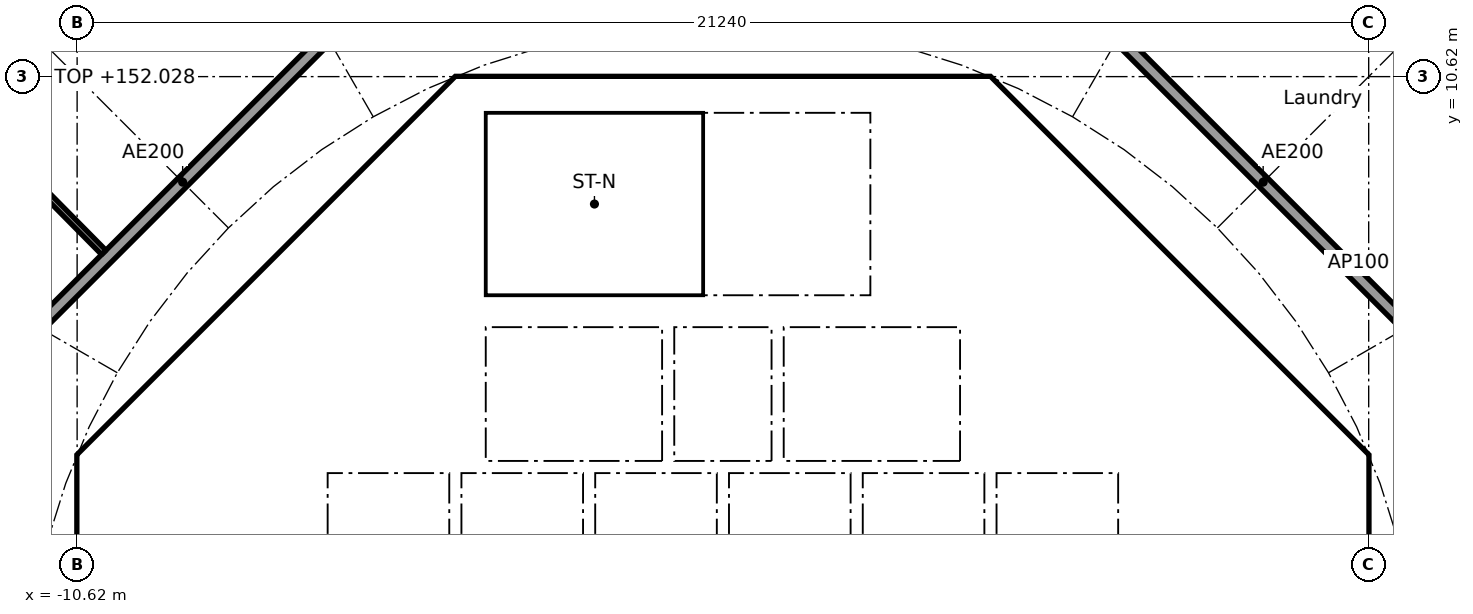
"""IFC4 building model, lengths in metres.
Left out: names, types, materials, properties, quantities, classifications, styles, units other than length and angle.
Written with IfcOpenShell. Run it as: python <this file> out.ifc"""

import sys

from ifc_helpers import new_model, si_unit, direction, frame, frame_2d, origin, place, context, subcontext, project, spatial, polyline, rectangle, outline, extrude, element, fill, save


model = new_model("IFC4")
c1 = context("Model", 3, precision=1e-05, world=origin(), true_north=direction((0.0, 1.0)))
c2 = subcontext(c1, "Body", "Model", "MODEL_VIEW")
j1 = project(units=[si_unit("LENGTHUNIT", "METRE"), si_unit("PLANEANGLEUNIT", "RADIAN")], contexts=[c1])
p1 = place(None, origin())
s1 = spatial("IfcSite", under=j1, at=p1, CompositionType="ELEMENT")
p2 = place(p1, origin())
s2 = spatial("IfcBuilding", under=s1, at=p2, CompositionType="ELEMENT")
p3 = place(p2, frame((0.0, 0.0, 149.2)))
s3 = spatial("IfcBuildingStorey", under=s2, at=p3, CompositionType="ELEMENT", Elevation=149.2)
p4 = place(p3, frame((9.988, 4.613, 0.0), z_axis=(0.0, 0.0, 1.0), x_axis=(-0.707106781187, 0.707106781187, 0.0)))
e1 = element("IfcWall", 1, at=p4, inside=s3, PredefinedType="SHEAR", context=c2, shape_type="SweptSolid", body=[
    extrude(rectangle(XDim=7.602, YDim=0.6, at=frame_2d((3.801, 0.0))), origin(), (0.0, 0.0, 1.0), 3.44),
])
p5 = place(p4, frame((3.201, 0.0, 0.0)))
e2 = element("IfcOpeningElement", 2, at=p5, cuts=e1, PredefinedType="OPENING", context=c2, shape_type="SweptSolid", body=[
    extrude(rectangle(XDim=1.2, YDim=2.1, at=frame_2d((0.6, 1.05))), frame((0.0, 0.31, 0.0), z_axis=(0.0, -1.0, 0.0), x_axis=(1.0, 0.0, 0.0)), (0.0, 0.0, 1.0), 0.62),
])
p6 = place(p3, frame((-4.613, 9.988, 0.0), z_axis=(0.0, 0.0, 1.0), x_axis=(-0.707106781187, -0.707106781187, 0.0)))
e3 = element("IfcWall", 3, at=p6, inside=s3, PredefinedType="SHEAR", context=c2, shape_type="SweptSolid", body=[
    extrude(rectangle(XDim=7.602, YDim=0.6, at=frame_2d((3.801, 0.0))), origin(), (0.0, 0.0, 1.0), 3.44),
])
p7 = place(p6, frame((0.351, 0.0, 0.0)))
e4 = element("IfcOpeningElement", 4, at=p7, cuts=e3, PredefinedType="OPENING", context=c2, shape_type="SweptSolid", body=[
    extrude(rectangle(XDim=1.1, YDim=2.1, at=frame_2d((0.55, 1.05))), frame((0.0, 0.31, 0.0), z_axis=(0.0, -1.0, 0.0), x_axis=(1.0, 0.0, 0.0)), (0.0, 0.0, 1.0), 0.62),
])
p8 = place(p3, frame((-10.325, 3.801, 0.0), z_axis=(0.0, 0.0, 1.0), x_axis=(0.0, -1.0, 0.0)))
e5 = element("IfcWall", 5, at=p8, inside=s3, PredefinedType="SHEAR", context=c2, shape_type="SweptSolid", body=[
    extrude(rectangle(XDim=7.602, YDim=0.6, at=frame_2d((3.801, 0.0))), origin(), (0.0, 0.0, 1.0), 3.44),
])
p9 = place(p8, frame((0.651, 0.0, 0.0)))
e6 = element("IfcOpeningElement", 6, at=p9, cuts=e5, PredefinedType="OPENING", context=c2, shape_type="SweptSolid", body=[
    extrude(rectangle(XDim=1.5, YDim=2.1, at=frame_2d((0.75, 1.05))), frame((0.0, 0.31, 0.0), z_axis=(0.0, -1.0, 0.0), x_axis=(1.0, 0.0, 0.0)), (0.0, 0.0, 1.0), 0.62),
])
p10 = place(p8, frame((5.451, 0.0, 0.0)))
e7 = element("IfcOpeningElement", 7, at=p10, cuts=e5, PredefinedType="OPENING", context=c2, shape_type="SweptSolid", body=[
    extrude(rectangle(XDim=1.5, YDim=2.1, at=frame_2d((0.75, 1.05))), frame((0.0, 0.31, 0.0), z_axis=(0.0, -1.0, 0.0), x_axis=(1.0, 0.0, 0.0)), (0.0, 0.0, 1.0), 0.62),
])
p11 = place(p3, frame((-5.8, 4.3, 0.0), z_axis=(0.0, 0.0, 1.0), x_axis=(0.0, 1.0, 0.0)))
e8 = element("IfcWall", 8, at=p11, inside=s3, PredefinedType="PARTITIONING", context=c2, shape_type="SweptSolid", body=[
    extrude(rectangle(XDim=3.927, YDim=0.15, at=frame_2d((1.963, 0.0))), origin(), (0.0, 0.0, 1.0), 3.44),
])
p12 = place(p11, frame((1.551, 0.0, 0.0)))
e9 = element("IfcOpeningElement", 9, at=p12, cuts=e8, PredefinedType="OPENING", context=c2, shape_type="SweptSolid", body=[
    extrude(rectangle(XDim=0.9, YDim=2.1, at=frame_2d((0.45, 1.05))), frame((0.0, 0.085, 0.0), z_axis=(0.0, -1.0, 0.0), x_axis=(1.0, 0.0, 0.0)), (0.0, 0.0, 1.0), 0.17),
])
p13 = place(p3, frame((4.0, 4.3, 0.0), z_axis=(0.0, 0.0, 1.0), x_axis=(0.0, 1.0, 0.0)))
e10 = element("IfcWall", 10, at=p13, inside=s3, PredefinedType="SOLIDWALL", context=c2, shape_type="SweptSolid", body=[
    extrude(rectangle(XDim=2.2, YDim=0.2, at=frame_2d((1.1, 0.0))), origin(), (0.0, 0.0, 1.0), 3.44),
])
p14 = place(p13, frame((0.55, 0.0, 0.0)))
e11 = element("IfcOpeningElement", 11, at=p14, cuts=e10, PredefinedType="OPENING", context=c2, shape_type="SweptSolid", body=[
    extrude(rectangle(XDim=1.1, YDim=2.1, at=frame_2d((0.55, 1.05))), frame((0.0, 0.11, 0.0), z_axis=(0.0, -1.0, 0.0), x_axis=(1.0, 0.0, 0.0)), (0.0, 0.0, 1.0), 0.22),
])
p15 = place(p3, frame((-4.0, 4.3, 0.0), z_axis=(0.0, 0.0, 1.0), x_axis=(0.0, 1.0, 0.0)))
e12 = element("IfcWall", 12, at=p15, inside=s3, PredefinedType="SOLIDWALL", context=c2, shape_type="SweptSolid", body=[
    extrude(rectangle(XDim=2.2, YDim=0.2, at=frame_2d((1.1, 0.0))), origin(), (0.0, 0.0, 1.0), 3.44),
])
p16 = place(p15, frame((0.55, 0.0, 0.0)))
e13 = element("IfcOpeningElement", 13, at=p16, cuts=e12, PredefinedType="OPENING", context=c2, shape_type="SweptSolid", body=[
    extrude(rectangle(XDim=1.1, YDim=2.1, at=frame_2d((0.55, 1.05))), frame((0.0, 0.11, 0.0), z_axis=(0.0, -1.0, 0.0), x_axis=(1.0, 0.0, 0.0)), (0.0, 0.0, 1.0), 0.22),
])
p17 = place(p3, frame((6.7, 4.0, 0.0), z_axis=(0.0, 0.0, 1.0), x_axis=(1.0, 0.0, 0.0)))
e14 = element("IfcWall", 14, at=p17, inside=s3, PredefinedType="SOLIDWALL", context=c2, shape_type="SweptSolid", body=[
    extrude(rectangle(XDim=3.325, YDim=0.2, at=frame_2d((1.662, 0.0))), origin(), (0.0, 0.0, 1.0), 3.44),
])
p18 = place(p17, frame((1.25, 0.0, 0.0)))
e15 = element("IfcOpeningElement", 15, at=p18, cuts=e14, PredefinedType="OPENING", context=c2, shape_type="SweptSolid", body=[
    extrude(rectangle(XDim=1.1, YDim=2.1, at=frame_2d((0.55, 1.05))), frame((0.0, 0.11, 0.0), z_axis=(0.0, -1.0, 0.0), x_axis=(1.0, 0.0, 0.0)), (0.0, 0.0, 1.0), 0.22),
])
p19 = place(p3, frame((4.0, 7.025, 0.0), z_axis=(0.0, 0.0, 1.0), x_axis=(0.0, 1.0, 0.0)))
e16 = element("IfcWall", 16, at=p19, inside=s3, PredefinedType="SOLIDWALL", context=c2, shape_type="SweptSolid", body=[
    extrude(rectangle(XDim=3.0, YDim=0.2, at=frame_2d((1.5, 0.0))), origin(), (0.0, 0.0, 1.0), 3.44),
])
p20 = place(p19, frame((0.925, 0.0, 0.0)))
e17 = element("IfcOpeningElement", 17, at=p20, cuts=e16, PredefinedType="OPENING", context=c2, shape_type="SweptSolid", body=[
    extrude(rectangle(XDim=1.1, YDim=2.1, at=frame_2d((0.55, 1.05))), frame((0.0, 0.11, 0.0), z_axis=(0.0, -1.0, 0.0), x_axis=(1.0, 0.0, 0.0)), (0.0, 0.0, 1.0), 0.22),
])
p21 = place(p3, origin())
e18 = element("IfcWall", 18, at=p21, inside=s3, PredefinedType="SHEAR", context=c2, shape_type="SweptSolid", body=[
    extrude(outline(polyline([(-10.2, 4.825), (-9.776, 4.401), (-10.025, 4.152), (-10.025, 3.801), (-10.625, 3.801), (-10.625, 4.401), (-10.2, 4.825)])), origin(), (0.0, 0.0, 1.0), 3.44),
])
p22 = place(p3, origin())
e19 = element("IfcWall", 19, at=p22, inside=s3, PredefinedType="SHEAR", context=c2, shape_type="SweptSolid", body=[
    extrude(outline(polyline([(-4.152, 10.025), (-4.401, 9.776), (-4.825, 10.2), (-4.401, 10.625), (4.401, 10.625), (4.825, 10.2), (4.401, 9.776), (4.152, 10.025), (-4.152, 10.025)])), origin(), (0.0, 0.0, 1.0), 3.44),
])
p23 = place(p3, origin())
e20 = element("IfcWall", 20, at=p23, inside=s3, PredefinedType="SHEAR", context=c2, shape_type="SweptSolid", body=[
    extrude(outline(polyline([(9.776, -4.401), (10.025, -4.152), (10.025, -3.801), (10.025, 4.152), (9.776, 4.401), (10.2, 4.825), (10.625, 4.401), (10.625, -4.401), (10.2, -4.825), (9.776, -4.401)])), origin(), (0.0, 0.0, 1.0), 3.44),
])
for number, where, z_axis, x_axis in (
    (21, (-0.9, 4.3, 0.0), (0.0, 0.0, 1.0), (0.0, 1.0, 0.0)),
    (22, (0.9, 4.3, 0.0), (0.0, 0.0, 1.0), (0.0, 1.0, 0.0)),
):
    element("IfcWall", number, at=place(p3, frame(where, z_axis=z_axis, x_axis=x_axis)), inside=s3, PredefinedType="SOLIDWALL", context=c2, shape_type="SweptSolid", body=[
        extrude(rectangle(XDim=2.2, YDim=0.2, at=frame_2d((1.1, 0.0))), origin(), (0.0, 0.0, 1.0), 3.44),
    ])
p24 = place(p3, origin())
e23 = element("IfcWall", 23, at=p24, inside=s3, PredefinedType="SOLIDWALL", context=c2, shape_type="SweptSolid", body=[
    extrude(outline(polyline([(-6.5, 2.1), (-6.7, 2.1), (-6.7, 4.3), (6.7, 4.3), (6.7, 2.1), (6.5, 2.1), (6.5, 4.1), (4.5, 4.1), (4.5, 2.1), (4.3, 2.1), (4.3, 4.1), (2.3, 4.1), (2.3, 2.1), (2.1, 2.1), (2.1, 4.1), (0.1, 4.1), (0.1, 2.1), (-0.1, 2.1), (-0.1, 4.1), (-2.1, 4.1), (-2.1, 2.1), (-2.3, 2.1), (-2.3, 4.1), (-4.3, 4.1), (-4.3, 2.1), (-4.5, 2.1), (-4.5, 4.1), (-6.5, 4.1), (-6.5, 2.1)])), origin(), (0.0, 0.0, 1.0), 3.44),
])
p25 = place(p3, frame((-10.025, 4.0, 0.0), z_axis=(0.0, 0.0, 1.0), x_axis=(1.0, 0.0, 0.0)))
e24 = element("IfcWall", 24, at=p25, inside=s3, PredefinedType="PARTITIONING", context=c2, shape_type="SweptSolid", body=[
    extrude(rectangle(XDim=3.325, YDim=0.2, at=frame_2d((1.662, 0.0))), origin(), (0.0, 0.0, 1.0), 3.44),
])
p26 = place(p3, origin())
e25 = element("IfcWall", 25, at=p26, inside=s3, PredefinedType="SOLIDWALL", context=c2, shape_type="SweptSolid", body=[
    extrude(outline(polyline([(-3.9, 7.025), (-4.1, 7.025), (-4.1, 10.025), (-3.9, 10.025), (-3.9, 7.025)])), origin(), (0.0, 0.0, 1.0), 3.44),
])
p27 = place(p3, origin())
e26 = element("IfcWall", 26, at=p27, inside=s3, PredefinedType="SOLIDWALL", context=c2, shape_type="SweptSolid", body=[
    extrude(outline(polyline([(4.1, 6.5), (-4.1, 6.5), (-4.1, 7.025), (4.1, 7.025), (4.1, 6.5)])), origin(), (0.0, 0.0, 1.0), 3.44),
])
p28 = place(p3, origin())
e27 = element("IfcWall", 27, at=p28, inside=s3, PredefinedType="SOLIDWALL", context=c2, shape_type="SweptSolid", body=[
    extrude(outline(polyline([(7.025, -3.9), (6.7, -3.9), (6.7, 3.9), (7.025, 3.9), (7.025, -3.9)])), origin(), (0.0, 0.0, 1.0), 3.44),
])
p29 = place(p3, frame((12.635, 5.134, 0.0), z_axis=(0.0, 0.0, 1.0), x_axis=(-0.707106781187, 0.707106781187, 0.0)))
e28 = element("IfcWall", 28, at=p29, inside=s3, PredefinedType="PARTITIONING", context=c2, shape_type="SweptSolid", body=[
    extrude(rectangle(XDim=10.609, YDim=0.2, at=frame_2d((5.305, 0.0))), origin(), (0.0, 0.0, 1.0), 3.44),
])
p30 = place(p3, frame((-5.275, 12.494, 0.0), z_axis=(0.0, 0.0, 1.0), x_axis=(-0.707106781187, -0.707106781187, 0.0)))
e29 = element("IfcWall", 29, at=p30, inside=s3, PredefinedType="PARTITIONING", context=c2, shape_type="SweptSolid", body=[
    extrude(rectangle(XDim=10.209, YDim=0.2, at=frame_2d((5.104, 0.0))), origin(), (0.0, 0.0, 1.0), 3.44),
])
p31 = place(p3, frame((15.185, 6.559, 0.0), z_axis=(0.0, 0.0, 1.0), x_axis=(-0.647361044962, 0.762183493304, 0.0)))
e30 = element("IfcWall", 30, at=p31, inside=s3, PredefinedType="PARTITIONING", context=c2, shape_type="SweptSolid", body=[
    extrude(rectangle(XDim=6.413, YDim=0.1, at=frame_2d((3.207, 0.0))), origin(), (0.0, 0.0, 1.0), 2.828),
])
p32 = place(p31, frame((2.731, 0.0, 0.0)))
e31 = element("IfcOpeningElement", 31, at=p32, cuts=e30, PredefinedType="OPENING", context=c2, shape_type="SweptSolid", body=[
    extrude(rectangle(XDim=0.9, YDim=2.1, at=frame_2d((0.45, 1.05))), frame((0.0, 0.06, 0.0), z_axis=(0.0, -1.0, 0.0), x_axis=(1.0, 0.0, 0.0)), (0.0, 0.0, 1.0), 0.12),
])
p33 = place(p3, frame((-9.622, 13.634, 0.0), z_axis=(0.0, 0.0, 1.0), x_axis=(-0.727710859679, -0.685884031528, 0.0)))
e32 = element("IfcWall", 32, at=p33, inside=s3, PredefinedType="PARTITIONING", context=c2, shape_type="SweptSolid", body=[
    extrude(rectangle(XDim=4.5, YDim=0.1, at=frame_2d((2.25, 0.0))), origin(), (0.0, 0.0, 1.0), 2.828),
])
p34 = place(p33, frame((1.825, 0.0, 0.0)))
e33 = element("IfcOpeningElement", 33, at=p34, cuts=e32, PredefinedType="OPENING", context=c2, shape_type="SweptSolid", body=[
    extrude(rectangle(XDim=0.9, YDim=2.1, at=frame_2d((0.45, 1.05))), frame((0.0, 0.06, 0.0), z_axis=(0.0, -1.0, 0.0), x_axis=(1.0, 0.0, 0.0)), (0.0, 0.0, 1.0), 0.12),
])
p35 = place(p3, frame((-10.182, 7.729, 0.0), z_axis=(0.0, 0.0, 1.0), x_axis=(-0.702927211734, 0.711261790766, 0.0)))
e34 = element("IfcWall", 34, at=p35, inside=s3, PredefinedType="PARTITIONING", context=c2, shape_type="SweptSolid", body=[
    extrude(rectangle(XDim=9.168, YDim=0.1, at=frame_2d((4.584, 0.0))), origin(), (0.0, 0.0, 1.0), 2.756),
])
p36 = place(p35, frame((6.067, 0.0, 0.0)))
e35 = element("IfcOpeningElement", 35, at=p36, cuts=e34, PredefinedType="OPENING", context=c2, shape_type="SweptSolid", body=[
    extrude(rectangle(XDim=0.9, YDim=2.1, at=frame_2d((0.45, 1.05))), frame((0.0, 0.06, 0.0), z_axis=(0.0, -1.0, 0.0), x_axis=(1.0, 0.0, 0.0)), (0.0, 0.0, 1.0), 0.12),
])
p37 = place(p14, origin())
e36 = element("IfcDoor", 36, at=p37, inside=s3, OperationType="DOUBLE_DOOR_SLIDING", PredefinedType="DOOR", context=c2, shape_type="SweptSolid", body=[
    extrude(rectangle(XDim=1.1, YDim=2.1, at=frame_2d((0.55, 1.05))), frame((0.0, 0.025, 0.0), z_axis=(0.0, -1.0, 0.0), x_axis=(1.0, 0.0, 0.0)), (0.0, 0.0, 1.0), 0.05),
])
fill(e11, e36)
p38 = place(p16, origin())
e37 = element("IfcDoor", 37, at=p38, inside=s3, OperationType="DOUBLE_DOOR_SLIDING", PredefinedType="DOOR", context=c2, shape_type="SweptSolid", body=[
    extrude(rectangle(XDim=1.1, YDim=2.1, at=frame_2d((0.55, 1.05))), frame((0.0, 0.025, 0.0), z_axis=(0.0, -1.0, 0.0), x_axis=(1.0, 0.0, 0.0)), (0.0, 0.0, 1.0), 0.05),
])
fill(e13, e37)
p39 = place(p18, frame((1.1, 0.0, 0.0), x_axis=(-1.0, 0.0, 0.0)))
e38 = element("IfcDoor", 38, at=p39, inside=s3, OperationType="SINGLE_SWING_LEFT", PredefinedType="DOOR", context=c2, shape_type="SweptSolid", body=[
    extrude(rectangle(XDim=1.1, YDim=2.1, at=frame_2d((0.55, 1.05))), frame((0.0, 0.025, 0.0), z_axis=(0.0, -1.0, 0.0), x_axis=(1.0, 0.0, 0.0)), (0.0, 0.0, 1.0), 0.05),
])
fill(e15, e38)
p40 = place(p20, origin())
e39 = element("IfcDoor", 39, at=p40, inside=s3, OperationType="SINGLE_SWING_RIGHT", PredefinedType="DOOR", context=c2, shape_type="SweptSolid", body=[
    extrude(rectangle(XDim=1.1, YDim=2.1, at=frame_2d((0.55, 1.05))), frame((0.0, 0.025, 0.0), z_axis=(0.0, -1.0, 0.0), x_axis=(1.0, 0.0, 0.0)), (0.0, 0.0, 1.0), 0.05),
])
fill(e17, e39)
p41 = place(p12, origin())
e40 = element("IfcDoor", 40, at=p41, inside=s3, OperationType="SINGLE_SWING_LEFT", PredefinedType="DOOR", context=c2, shape_type="SweptSolid", body=[
    extrude(rectangle(XDim=0.9, YDim=2.1, at=frame_2d((0.45, 1.05))), frame((0.0, 0.025, 0.0), z_axis=(0.0, -1.0, 0.0), x_axis=(1.0, 0.0, 0.0)), (0.0, 0.0, 1.0), 0.05),
])
fill(e9, e40)
p42 = place(p5, origin())
e41 = element("IfcDoor", 41, at=p42, inside=s3, OperationType="SINGLE_SWING_LEFT", PredefinedType="DOOR", context=c2, shape_type="SweptSolid", body=[
    extrude(rectangle(XDim=1.2, YDim=2.1, at=frame_2d((0.6, 1.05))), frame((0.0, 0.025, 0.0), z_axis=(0.0, -1.0, 0.0), x_axis=(1.0, 0.0, 0.0)), (0.0, 0.0, 1.0), 0.05),
])
fill(e2, e41)
p43 = place(p9, origin())
e42 = element("IfcDoor", 42, at=p43, inside=s3, OperationType="DOUBLE_DOOR_SINGLE_SWING", PredefinedType="DOOR", context=c2, shape_type="SweptSolid", body=[
    extrude(rectangle(XDim=1.5, YDim=2.1, at=frame_2d((0.75, 1.05))), frame((0.0, 0.025, 0.0), z_axis=(0.0, -1.0, 0.0), x_axis=(1.0, 0.0, 0.0)), (0.0, 0.0, 1.0), 0.05),
])
fill(e6, e42)
p44 = place(p7, origin())
e43 = element("IfcDoor", 43, at=p44, inside=s3, OperationType="SINGLE_SWING_LEFT", PredefinedType="DOOR", context=c2, shape_type="SweptSolid", body=[
    extrude(rectangle(XDim=1.1, YDim=2.1, at=frame_2d((0.55, 1.05))), frame((0.0, 0.025, 0.0), z_axis=(0.0, -1.0, 0.0), x_axis=(1.0, 0.0, 0.0)), (0.0, 0.0, 1.0), 0.05),
])
fill(e4, e43)
save(model, sys.argv[1])
